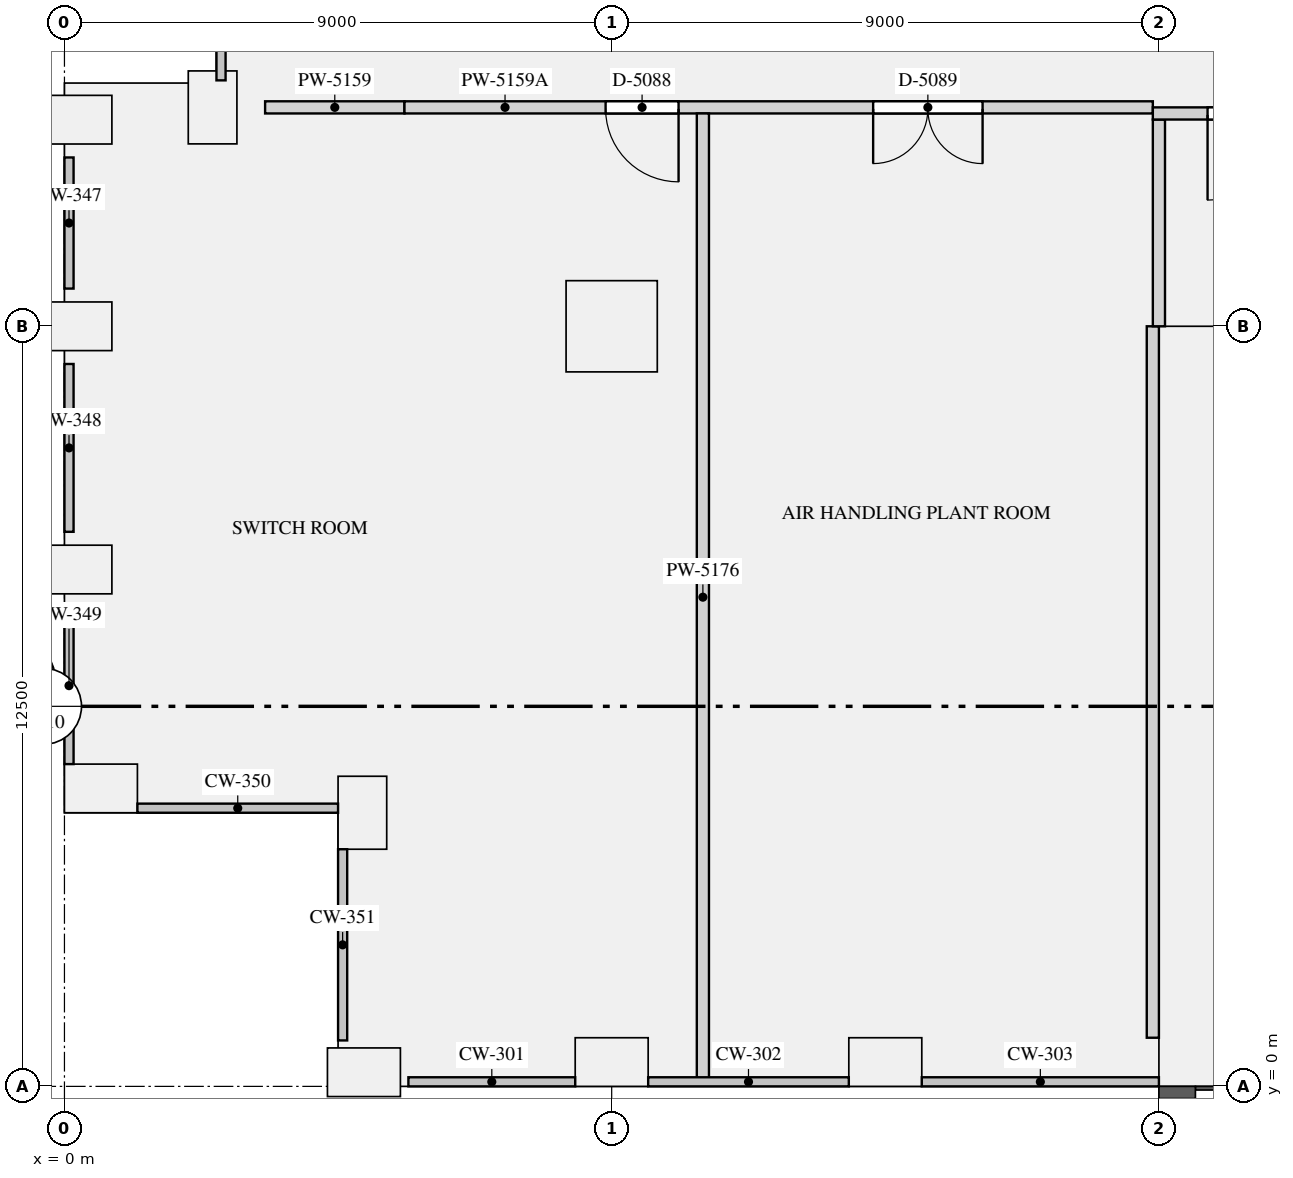
"""IFC4 building model, lengths in metres.
Left out: names, types, materials, properties, quantities, classifications, styles, units other than length and angle.
Written with IfcOpenShell. Run it as: python <this file> out.ifc"""

import sys

from ifc_helpers import new_model, si_unit, direction, frame, frame_2d, origin, origin_2d, place, context, subcontext, project, spatial, rectangle, extrude, element, fill, save


model = new_model("IFC4")
c1 = context("Model", 3, precision=1e-05, world=origin(), true_north=direction((0.0, 1.0)))
c2 = subcontext(c1, "Body", "Model", "MODEL_VIEW")
j1 = project(units=[si_unit("LENGTHUNIT", "METRE"), si_unit("PLANEANGLEUNIT", "RADIAN")], contexts=[c1])
p1 = place(None, origin())
s1 = spatial("IfcSite", under=j1, at=p1, CompositionType="ELEMENT")
p2 = place(p1, origin())
s2 = spatial("IfcBuilding", under=s1, at=p2, CompositionType="ELEMENT")
p3 = place(p2, frame((0.0, 0.0, 73.05)))
s3 = spatial("IfcBuildingStorey", under=s2, at=p3, CompositionType="ELEMENT", Elevation=73.05)
p4 = place(p3, frame((9.0, 0.4, 0.0), z_axis=(0.0, 0.0, 1.0), x_axis=(1.0, 0.0, 0.0)))
e1 = element("IfcColumn", 1, at=p4, inside=s3, PredefinedType="USERDEFINED", context=c2, shape_type="SweptSolid", body=[
    extrude(rectangle(XDim=1.2, YDim=0.8, at=origin_2d()), origin(), (0.0, 0.0, 1.0), 4.16),
])
p5 = place(p3, frame((13.5, 0.4, 0.0), z_axis=(0.0, 0.0, 1.0), x_axis=(1.0, 0.0, 0.0)))
e2 = element("IfcColumn", 2, at=p5, inside=s3, PredefinedType="USERDEFINED", context=c2, shape_type="SweptSolid", body=[
    extrude(rectangle(XDim=1.2, YDim=0.8, at=origin_2d()), origin(), (0.0, 0.0, 1.0), 4.2),
])
for number, where, z_axis, x_axis in (
    (3, (0.6, 4.9, 0.0), (0.0, 0.0, 1.0), (1.0, 0.0, 0.0)),
    (4, (4.9, 4.5, 0.0), (0.0, 0.0, 1.0), (0.0, -1.0, 0.0)),
):
    element("IfcColumn", number, at=place(p3, frame(where, z_axis=z_axis, x_axis=x_axis)), inside=s3, PredefinedType="USERDEFINED", context=c2, shape_type="SweptSolid", body=[
        extrude(rectangle(XDim=1.2, YDim=0.8, at=origin_2d()), origin(), (0.0, 0.0, 1.0), 4.16),
    ])
p6 = place(p3, frame((2.436, 16.1, -0.06), z_axis=(0.731043450317, 0.004056748068, 0.682318852549), x_axis=(-0.682308347041, -0.00378630445, 0.7310547062)))
e5 = element("IfcColumn", 5, at=p6, inside=s3, PredefinedType="USERDEFINED", context=c2, shape_type="SweptSolid", body=[
    extrude(rectangle(XDim=1.2, YDim=0.8, at=origin_2d()), origin(), (0.0, 0.0, 1.0), 5.597),
])
p7 = place(p3, frame((0.18, 15.897, -0.206), z_axis=(0.729132704509, 0.008165571295, 0.684323624217), x_axis=(-0.011198317176, 0.99993729688, 0.0)))
e6 = element("IfcColumn", 6, at=p7, inside=s3, PredefinedType="USERDEFINED", context=c2, shape_type="SweptSolid", body=[
    extrude(rectangle(XDim=1.2, YDim=0.8, at=origin_2d()), origin(), (0.0, 0.0, 1.0), 6.01),
])
for number, where, z_axis, x_axis in (
    (7, (0.18, 12.5, -0.206), (0.729, 0.0, 0.684), (0.0, 1.0, 0.0)),
    (8, (0.18, 8.5, -0.206), (0.729, 0.0, 0.684), (0.0, 1.0, 0.0)),
):
    element("IfcColumn", number, at=place(p3, frame(where, z_axis=z_axis, x_axis=x_axis)), inside=s3, PredefinedType="USERDEFINED", context=c2, shape_type="SweptSolid", body=[
        extrude(rectangle(XDim=1.2, YDim=0.8, at=origin_2d()), origin(), (0.0, 0.0, 1.0), 6.01),
    ])
p8 = place(p3, frame((4.925, 0.232, -0.172), z_axis=(0.58874483324, 0.564646005754, 0.578406785507), x_axis=(-0.692181494987, 0.721723477516, 0.0)))
e9 = element("IfcColumn", 9, at=p8, inside=s3, PredefinedType="USERDEFINED", context=c2, shape_type="SweptSolid", body=[
    extrude(rectangle(XDim=1.2, YDim=0.8, at=origin_2d()), origin(), (0.0, 0.0, 1.0), 6.99),
])
p9 = place(p3, frame((9.0, 12.5, 0.0), z_axis=(0.0, 0.0, 1.0), x_axis=(1.0, 0.0, 0.0)))
e10 = element("IfcColumn", 10, at=p9, inside=s3, PredefinedType="COLUMN", context=c2, shape_type="SweptSolid", body=[
    extrude(rectangle(XDim=1.5, YDim=1.5, at=origin_2d()), origin(), (0.0, 0.0, 1.0), 4.2),
])
p10 = place(p3, frame((18.5, 0.0, 0.0), z_axis=(0.0, 0.0, 1.0), x_axis=(0.0, 1.0, 0.0)))
e11 = element("IfcWall", 11, at=p10, inside=s3, PredefinedType="SHEAR", context=c2, shape_type="SweptSolid", body=[
    extrude(rectangle(XDim=12.5, YDim=1.0, at=frame_2d((6.25, 0.0))), origin(), (0.0, 0.0, 1.0), 4.2),
])
p11 = place(p3, frame((18.0, 12.5, 0.0), z_axis=(0.0, 0.0, 1.0), x_axis=(0.0, 1.0, 0.0)))
e12 = element("IfcWall", 12, at=p11, inside=s3, PredefinedType="PARTITIONING", context=c2, shape_type="SweptSolid", body=[
    extrude(rectangle(XDim=3.4, YDim=0.2, at=frame_2d((1.7, 0.0))), origin(), (0.0, 0.0, 1.0), 3.7),
])
p12 = place(p3, frame((17.9, 16.0, 0.0), z_axis=(0.0, 0.0, 1.0), x_axis=(1.0, 0.0, 0.0)))
e13 = element("IfcWall", 13, at=p12, inside=s3, PredefinedType="PARTITIONING", context=c2, shape_type="SweptSolid", body=[
    extrude(rectangle(XDim=36.2, YDim=0.2, at=frame_2d((18.1, 0.0))), origin(), (0.0, 0.0, 1.0), 3.7),
])
p13 = place(p12, frame((0.9, 0.0, 0.0)))
e14 = element("IfcOpeningElement", 14, at=p13, cuts=e13, PredefinedType="OPENING", context=c2, shape_type="SweptSolid", body=[
    extrude(rectangle(XDim=1.4, YDim=2.1, at=frame_2d((0.7, 1.05))), frame((0.0, 0.11, 0.0), z_axis=(0.0, -1.0, 0.0), x_axis=(1.0, 0.0, 0.0)), (0.0, 0.0, 1.0), 0.22),
])
p14 = place(p12, frame((33.9, 0.0, 0.0)))
e15 = element("IfcOpeningElement", 15, at=p14, cuts=e13, PredefinedType="OPENING", context=c2, shape_type="SweptSolid", body=[
    extrude(rectangle(XDim=1.4, YDim=2.1, at=frame_2d((0.7, 1.05))), frame((0.0, 0.11, 0.0), z_axis=(0.0, -1.0, 0.0), x_axis=(1.0, 0.0, 0.0)), (0.0, 0.0, 1.0), 0.22),
])
p15 = place(p3, frame((3.3, 16.1, 0.0), z_axis=(0.0, 0.0, 1.0), x_axis=(1.0, 0.0, 0.0)))
e16 = element("IfcWall", 16, at=p15, inside=s3, PredefinedType="PARTITIONING", context=c2, shape_type="SweptSolid", body=[
    extrude(rectangle(XDim=2.292, YDim=0.2, at=frame_2d((1.146, 0.0))), origin(), (0.0, 0.0, 1.0), 2.8),
])
p16 = place(p3, frame((5.592, 16.1, 0.0), z_axis=(0.0, 0.0, 1.0), x_axis=(1.0, 0.0, 0.0)))
e17 = element("IfcWall", 17, at=p16, inside=s3, PredefinedType="PARTITIONING", context=c2, shape_type="SweptSolid", body=[
    extrude(rectangle(XDim=12.308, YDim=0.2, at=frame_2d((6.154, 0.0))), origin(), (0.0, 0.0, 1.0), 3.7),
])
p17 = place(p16, frame((3.308, 0.0, 0.0)))
e18 = element("IfcOpeningElement", 18, at=p17, cuts=e17, PredefinedType="OPENING", context=c2, shape_type="SweptSolid", body=[
    extrude(rectangle(XDim=1.2, YDim=2.1, at=frame_2d((0.6, 1.05))), frame((0.0, 0.11, 0.0), z_axis=(0.0, -1.0, 0.0), x_axis=(1.0, 0.0, 0.0)), (0.0, 0.0, 1.0), 0.22),
])
p18 = place(p16, frame((7.708, 0.0, 0.0)))
e19 = element("IfcOpeningElement", 19, at=p18, cuts=e17, PredefinedType="OPENING", context=c2, shape_type="SweptSolid", body=[
    extrude(rectangle(XDim=1.8, YDim=2.1, at=frame_2d((0.9, 1.05))), frame((0.0, 0.11, 0.0), z_axis=(0.0, -1.0, 0.0), x_axis=(1.0, 0.0, 0.0)), (0.0, 0.0, 1.0), 0.22),
])
p19 = place(p3, frame((10.5, 0.09, 0.0), z_axis=(0.0, 0.0, 1.0), x_axis=(0.0, 1.0, 0.0)))
e20 = element("IfcWall", 20, at=p19, inside=s3, PredefinedType="PARTITIONING", context=c2, shape_type="SweptSolid", body=[
    extrude(rectangle(XDim=15.91, YDim=0.2, at=frame_2d((7.955, 0.0))), origin(), (0.0, 0.0, 1.0), 3.7),
])
p20 = place(p3, frame((17.9, 0.8, 0.0), z_axis=(0.0, 0.0, 1.0), x_axis=(0.0, 1.0, 0.0)))
e21 = element("IfcWall", 21, at=p20, inside=s3, PredefinedType="PARTITIONING", context=c2, shape_type="SweptSolid", body=[
    extrude(rectangle(XDim=11.7, YDim=0.2, at=frame_2d((5.85, 0.0))), origin(), (0.0, 0.0, 1.0), 3.7),
])
p21 = place(p13, frame((1.4, 0.0, 0.0), z_axis=(0.0, 0.0, 1.0), x_axis=(-1.0, 0.0, 0.0)))
e22 = element("IfcDoor", 22, at=p21, inside=s3, OperationType="SINGLE_SWING_RIGHT", PredefinedType="DOOR", context=c2, shape_type="SweptSolid", body=[
    extrude(rectangle(XDim=1.4, YDim=2.1, at=frame_2d((0.7, 1.05))), frame((0.0, 0.025, 0.0), z_axis=(0.0, -1.0, 0.0), x_axis=(1.0, 0.0, 0.0)), (0.0, 0.0, 1.0), 0.05),
])
fill(e14, e22)
p22 = place(p17, frame((1.2, 0.0, 0.0), z_axis=(0.0, 0.0, 1.0), x_axis=(-1.0, 0.0, 0.0)))
e23 = element("IfcDoor", 23, at=p22, inside=s3, OperationType="SINGLE_SWING_LEFT", PredefinedType="DOOR", context=c2, shape_type="SweptSolid", body=[
    extrude(rectangle(XDim=1.2, YDim=2.1, at=frame_2d((0.6, 1.05))), frame((0.0, 0.025, 0.0), z_axis=(0.0, -1.0, 0.0), x_axis=(1.0, 0.0, 0.0)), (0.0, 0.0, 1.0), 0.05),
])
fill(e18, e23)
p23 = place(p18, frame((1.8, 0.0, 0.0), z_axis=(0.0, 0.0, 1.0), x_axis=(-1.0, 0.0, 0.0)))
e24 = element("IfcDoor", 24, at=p23, inside=s3, OperationType="DOUBLE_DOOR_SINGLE_SWING", PredefinedType="DOOR", context=c2, shape_type="SweptSolid", body=[
    extrude(rectangle(XDim=1.8, YDim=2.1, at=frame_2d((0.9, 1.05))), frame((0.0, 0.025, 0.0), z_axis=(0.0, -1.0, 0.0), x_axis=(1.0, 0.0, 0.0)), (0.0, 0.0, 1.0), 0.05),
])
fill(e19, e24)
save(model, sys.argv[1])
